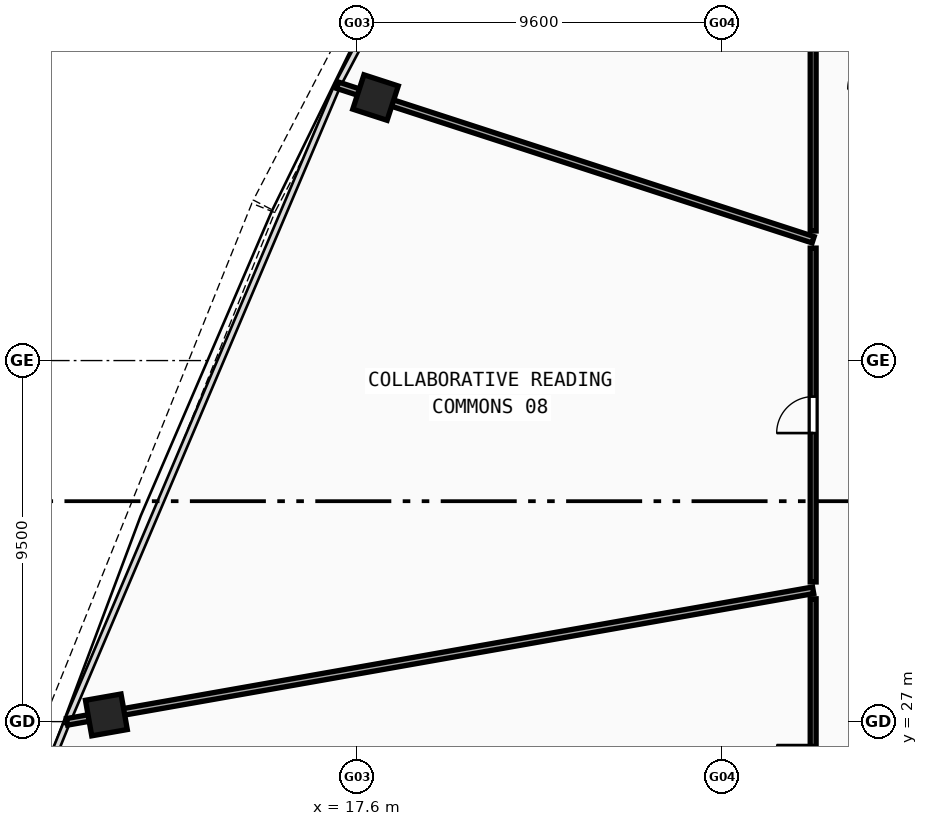
"""IFC4 building model, lengths in metres.
Left out: names, types, materials, properties, quantities, classifications, styles, units other than length and angle.
Written with IfcOpenShell. Run it as: python <this file> out.ifc"""

import sys

from ifc_helpers import new_model, si_unit, direction, frame, frame_2d, origin, origin_with_axes, origin_2d, place, context, subcontext, project, spatial, rectangle, hollow_rectangle, extrude, source, transform, mapped, element, fill, save


model = new_model("IFC4")
c1 = context("Model", 3, precision=1e-05, world=origin(), true_north=direction((0.0, 1.0)))
c2 = subcontext(c1, "Body", "Model", "MODEL_VIEW")
j1 = project(units=[si_unit("LENGTHUNIT", "METRE"), si_unit("PLANEANGLEUNIT", "RADIAN")], contexts=[c1])
p1 = place(None, origin())
s1 = spatial("IfcSite", under=j1, at=p1, CompositionType="ELEMENT")
p2 = place(p1, origin())
s2 = spatial("IfcBuilding", under=s1, at=p2, CompositionType="ELEMENT")
p3 = place(p2, frame((0.0, 0.0, 170.31)))
s3 = spatial("IfcBuildingStorey", under=s2, at=p3, CompositionType="ELEMENT", Elevation=170.31)
m1 = source(origin(), c2, "Body", "SweptSolid", [
    extrude(hollow_rectangle(XDim=0.95, YDim=0.95, WallThickness=0.04, at=origin_2d()), origin(), (0.0, 0.0, 1.0), 5.83),
])
for number, where, z_axis, x_axis in (
    (1, (18.085, 43.42, -0.26), (0.0, 0.0, 1.0), (-0.309, -0.951, 0.0)),
    (2, (11.003, 27.177, -0.26), (0.0, 0.0, 1.0), (0.174, -0.985, 0.0)),
):
    element("IfcColumn", number, at=place(p3, frame(where, z_axis=z_axis, x_axis=x_axis)), inside=s3, PredefinedType="COLUMN", context=c2, shape_type="MappedRepresentation", body=[
        mapped(m1, transform((0.0, 0.0, 0.0), scale=1.0)),
    ])
p4 = place(p3, frame((29.6, 39.678, 0.0), z_axis=(0.0, 0.0, 1.0), x_axis=(-0.951058745875, 0.309010132349, 0.0)))
e3 = element("IfcWall", 3, at=p4, inside=s3, PredefinedType="PARTITIONING", context=c2, shape_type="SweptSolid", body=[
    extrude(rectangle(XDim=13.158, YDim=0.175, at=frame_2d((6.579, 0.0))), origin(), (0.0, 0.0, 1.0), 2.22),
])
p5 = place(p3, frame((29.6, 30.456, 0.0), z_axis=(0.0, 0.0, 1.0), x_axis=(-0.984808700761, -0.173642802629, 0.0)))
e4 = element("IfcWall", 4, at=p5, inside=s3, PredefinedType="PARTITIONING", context=c2, shape_type="SweptSolid", body=[
    extrude(rectangle(XDim=19.934, YDim=0.175, at=frame_2d((9.967, 0.0))), origin(), (0.0, 0.0, 1.0), 2.22),
])
p6 = place(p3, frame((29.6, 21.8, 0.0), z_axis=(0.0, 0.0, 1.0), x_axis=(0.0, 1.0, 0.0)))
e5 = element("IfcWall", 5, at=p6, inside=s3, PredefinedType="PARTITIONING", context=c2, shape_type="SweptSolid", body=[
    extrude(rectangle(XDim=8.432, YDim=0.155, at=frame_2d((4.216, 0.0))), origin(), (0.0, 0.0, 1.0), 2.22),
])
p7 = place(p6, frame((3.623, 0.0, 0.0)))
e6 = element("IfcOpeningElement", 6, at=p7, cuts=e5, PredefinedType="OPENING", context=c2, shape_type="SweptSolid", body=[
    extrude(rectangle(XDim=0.96, YDim=2.12, at=frame_2d((0.48, 1.06))), frame((0.0, 0.087, 0.0), z_axis=(0.0, -1.0, 0.0), x_axis=(1.0, 0.0, 0.0)), (0.0, 0.0, 1.0), 0.175),
])
p8 = place(p3, frame((29.6, 30.675, 0.0), z_axis=(0.0, 0.0, 1.0), x_axis=(0.0, 1.0, 0.0)))
e7 = element("IfcWall", 7, at=p8, inside=s3, PredefinedType="PARTITIONING", context=c2, shape_type="SweptSolid", body=[
    extrude(rectangle(XDim=8.783, YDim=0.155, at=frame_2d((4.392, 0.0))), origin(), (0.0, 0.0, 1.0), 2.22),
])
p9 = place(p8, frame((3.917, 0.0, 0.0)))
e8 = element("IfcOpeningElement", 8, at=p9, cuts=e7, PredefinedType="OPENING", context=c2, shape_type="SweptSolid", body=[
    extrude(rectangle(XDim=0.96, YDim=2.12, at=frame_2d((0.48, 1.06))), frame((0.0, 0.087, 0.0), z_axis=(0.0, -1.0, 0.0), x_axis=(1.0, 0.0, 0.0)), (0.0, 0.0, 1.0), 0.175),
])
p10 = place(p3, frame((29.6, 39.91, 0.0), z_axis=(0.0, 0.0, 1.0), x_axis=(0.0, 1.0, 0.0)))
e9 = element("IfcWall", 9, at=p10, inside=s3, PredefinedType="PARTITIONING", context=c2, shape_type="SweptSolid", body=[
    extrude(rectangle(XDim=15.89, YDim=0.155, at=frame_2d((7.945, 0.0))), origin(), (0.0, 0.0, 1.0), 2.22),
])
p11 = place(p10, frame((7.584, 0.0, 0.0)))
e10 = element("IfcOpeningElement", 10, at=p11, cuts=e9, PredefinedType="OPENING", context=c2, shape_type="SweptSolid", body=[
    extrude(rectangle(XDim=0.96, YDim=2.12, at=frame_2d((0.48, 1.06))), frame((0.0, 0.087, 0.0), z_axis=(0.0, -1.0, 0.0), x_axis=(1.0, 0.0, 0.0)), (0.0, 0.0, 1.0), 0.175),
])
m2 = source(origin(), c2, "Body", "SweptSolid", [
    extrude(rectangle(XDim=0.96, YDim=2.12, at=frame_2d((0.48, 1.06))), frame((0.0, 0.025, 0.0), z_axis=(0.0, -1.0, 0.0), x_axis=(1.0, 0.0, 0.0)), (0.0, 0.0, 1.0), 0.05),
])
p12 = place(p9, origin_with_axes())
e11 = element("IfcDoor", 11, at=p12, inside=s3, OperationType="SINGLE_SWING_LEFT", PredefinedType="DOOR", context=c2, shape_type="MappedRepresentation", body=[
    mapped(m2, transform((0.0, 0.0, 0.0), scale=1.0)),
])
fill(e8, e11)
p13 = place(p7, origin_with_axes())
e12 = element("IfcDoor", 12, at=p13, inside=s3, OperationType="SINGLE_SWING_RIGHT", PredefinedType="DOOR", context=c2, shape_type="MappedRepresentation", body=[
    mapped(m2, transform((0.0, 0.0, 0.0), scale=1.0)),
])
fill(e6, e12)
save(model, sys.argv[1])
